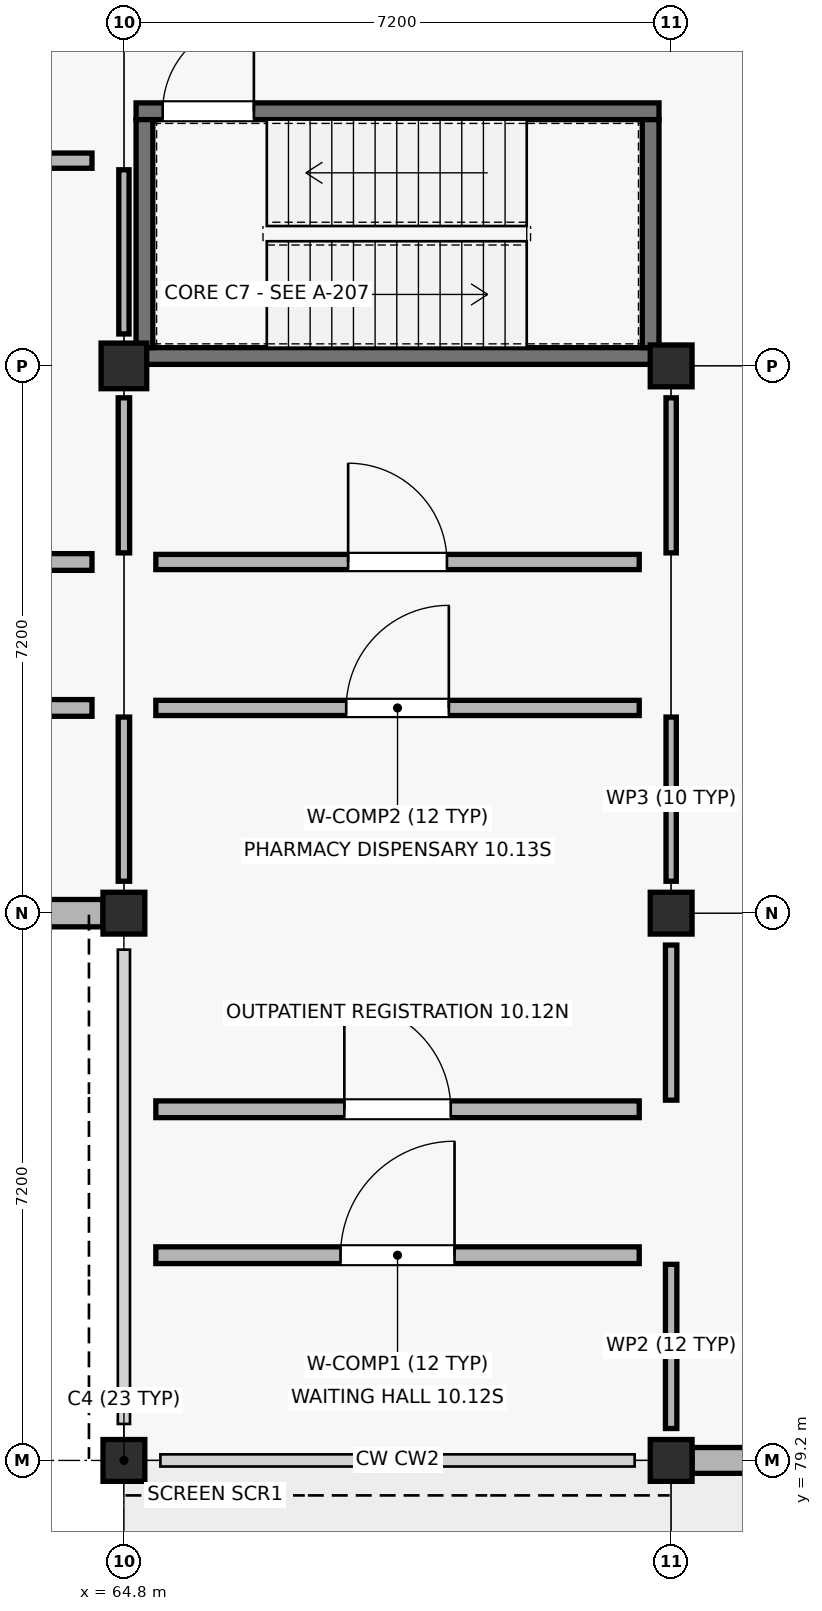
"""IFC4 building model, lengths in metres.
Left out: names, types, materials, properties, quantities, classifications, styles, units other than length and angle.
Written with IfcOpenShell. Run it as: python <this file> out.ifc"""

import sys

from ifc_helpers import new_model, si_unit, direction, frame, frame_2d, origin, origin_2d, place, context, subcontext, project, spatial, rectangle, extrude, element, fill, save


model = new_model("IFC4")
c1 = context("Model", 3, precision=1e-05, world=origin(), true_north=direction((0.0, 1.0)))
c2 = subcontext(c1, "Body", "Model", "MODEL_VIEW")
j1 = project(units=[si_unit("LENGTHUNIT", "METRE"), si_unit("PLANEANGLEUNIT", "RADIAN")], contexts=[c1])
p1 = place(None, origin())
s1 = spatial("IfcSite", under=j1, at=p1, CompositionType="ELEMENT")
p2 = place(p1, origin())
s2 = spatial("IfcBuilding", under=s1, at=p2, CompositionType="ELEMENT")
p3 = place(p2, origin())
s3 = spatial("IfcBuildingStorey", under=s2, at=p3, CompositionType="ELEMENT", Elevation=0.0)
for number, where, z_axis, x_axis in (
    (1, (64.8, 79.2, -0.25), (0.0, 0.0, 1.0), (1.0, 0.0, 0.0)),
    (2, (64.8, 86.4, -0.25), (0.0, 0.0, 1.0), (1.0, 0.0, 0.0)),
):
    element("IfcColumn", number, at=place(p3, frame(where, z_axis=z_axis, x_axis=x_axis)), inside=s3, PredefinedType="COLUMN", context=c2, shape_type="SweptSolid", body=[
        extrude(rectangle(XDim=0.55, YDim=0.55, at=origin_2d()), origin(), (0.0, 0.0, 1.0), 4.75),
    ])
p4 = place(p3, frame((64.8, 93.6, -0.25), z_axis=(0.0, 0.0, 1.0), x_axis=(1.0, 0.0, 0.0)))
e3 = element("IfcColumn", 3, at=p4, inside=s3, PredefinedType="COLUMN", context=c2, shape_type="SweptSolid", body=[
    extrude(rectangle(XDim=0.6, YDim=0.6, at=origin_2d()), origin(), (0.0, 0.0, 1.0), 4.75),
])
for number, where, z_axis, x_axis in (
    (4, (72.0, 79.2, -0.25), (0.0, 0.0, 1.0), (1.0, 0.0, 0.0)),
    (5, (72.0, 86.4, -0.25), (0.0, 0.0, 1.0), (1.0, 0.0, 0.0)),
    (6, (72.0, 93.6, -0.25), (0.0, 0.0, 1.0), (1.0, 0.0, 0.0)),
):
    element("IfcColumn", number, at=place(p3, frame(where, z_axis=z_axis, x_axis=x_axis)), inside=s3, PredefinedType="COLUMN", context=c2, shape_type="SweptSolid", body=[
        extrude(rectangle(XDim=0.55, YDim=0.55, at=origin_2d()), origin(), (0.0, 0.0, 1.0), 4.75),
    ])
p5 = place(p3, frame((57.9, 86.4, 0.0), z_axis=(0.0, 0.0, 1.0), x_axis=(1.0, 0.0, 0.0)))
e7 = element("IfcWall", 7, at=p5, inside=s3, PredefinedType="SOLIDWALL", context=c2, shape_type="SweptSolid", body=[
    extrude(rectangle(XDim=6.625, YDim=0.36, at=frame_2d((3.312, 0.0))), origin(), (0.0, 0.0, 1.0), 3.47),
])
p6 = place(p5, frame((0.925, 0.0, 0.9)))
e8 = element("IfcOpeningElement", 8, at=p6, cuts=e7, PredefinedType="OPENING", context=c2, shape_type="SweptSolid", body=[
    extrude(rectangle(XDim=1.65, YDim=1.88, at=frame_2d((0.825, 0.94))), frame((0.0, 0.19, 0.0), z_axis=(0.0, -1.0, 0.0), x_axis=(1.0, 0.0, 0.0)), (0.0, 0.0, 1.0), 0.38),
])
p7 = place(p5, frame((4.05, 0.0, 0.9)))
e9 = element("IfcOpeningElement", 9, at=p7, cuts=e7, PredefinedType="OPENING", context=c2, shape_type="SweptSolid", body=[
    extrude(rectangle(XDim=1.65, YDim=1.88, at=frame_2d((0.825, 0.94))), frame((0.0, 0.19, 0.0), z_axis=(0.0, -1.0, 0.0), x_axis=(1.0, 0.0, 0.0)), (0.0, 0.0, 1.0), 0.38),
])
p8 = place(p3, frame((78.95, 79.2, 0.0), z_axis=(0.0, 0.0, 1.0), x_axis=(-1.0, 0.0, 0.0)))
e10 = element("IfcWall", 10, at=p8, inside=s3, PredefinedType="SOLIDWALL", context=c2, shape_type="SweptSolid", body=[
    extrude(rectangle(XDim=6.675, YDim=0.34, at=frame_2d((3.337, 0.0))), origin(), (0.0, 0.0, 1.0), 3.47),
])
p9 = place(p8, frame((2.438, 0.0, 0.0)))
e11 = element("IfcOpeningElement", 11, at=p9, cuts=e10, PredefinedType="OPENING", context=c2, shape_type="SweptSolid", body=[
    extrude(rectangle(XDim=1.8, YDim=2.25, at=frame_2d((0.9, 1.125))), frame((0.0, 0.18, 0.0), z_axis=(0.0, -1.0, 0.0), x_axis=(1.0, 0.0, 0.0)), (0.0, 0.0, 1.0), 0.36),
])
p10 = place(p3, frame((64.96, 93.73, -0.25), z_axis=(0.0, 0.0, 1.0), x_axis=(1.0, 0.0, 0.0)))
e12 = element("IfcWall", 12, at=p10, inside=s3, PredefinedType="SHEAR", context=c2, shape_type="SweptSolid", body=[
    extrude(rectangle(XDim=6.88, YDim=0.22, at=frame_2d((3.44, 0.0))), origin(), (0.0, 0.0, 1.0), 4.47),
])
p11 = place(p3, frame((64.96, 96.95, -0.25), z_axis=(0.0, 0.0, 1.0), x_axis=(1.0, 0.0, 0.0)))
e13 = element("IfcWall", 13, at=p11, inside=s3, PredefinedType="SHEAR", context=c2, shape_type="SweptSolid", body=[
    extrude(rectangle(XDim=6.88, YDim=0.22, at=frame_2d((3.44, 0.0))), origin(), (0.0, 0.0, 1.0), 4.47),
])
p12 = place(p11, frame((0.35, 0.0, 0.25)))
e14 = element("IfcOpeningElement", 14, at=p12, cuts=e13, PredefinedType="OPENING", context=c2, shape_type="SweptSolid", body=[
    extrude(rectangle(XDim=1.2, YDim=2.15, at=frame_2d((0.6, 1.075))), frame((0.0, 0.12, 0.0), z_axis=(0.0, -1.0, 0.0), x_axis=(1.0, 0.0, 0.0)), (0.0, 0.0, 1.0), 0.24),
])
for number, where, z_axis, x_axis in (
    (15, (65.07, 93.84, -0.25), (0.0, 0.0, 1.0), (0.0, 1.0, 0.0)),
    (16, (71.73, 93.84, -0.25), (0.0, 0.0, 1.0), (0.0, 1.0, 0.0)),
):
    element("IfcWall", number, at=place(p3, frame(where, z_axis=z_axis, x_axis=x_axis)), inside=s3, PredefinedType="SHEAR", context=c2, shape_type="SweptSolid", body=[
        extrude(rectangle(XDim=3.0, YDim=0.22, at=frame_2d((1.5, 0.0))), origin(), (0.0, 0.0, 1.0), 4.47),
    ])
p13 = place(p3, frame((65.22, 81.9, 0.0), z_axis=(0.0, 0.0, 1.0), x_axis=(1.0, 0.0, 0.0)))
e17 = element("IfcWall", 17, at=p13, inside=s3, PredefinedType="SOLIDWALL", context=c2, shape_type="SweptSolid", body=[
    extrude(rectangle(XDim=6.36, YDim=0.22, at=frame_2d((3.18, 0.0))), origin(), (0.0, 0.0, 1.0), 3.36),
])
p14 = place(p13, frame((2.43, 0.0, 0.0)))
e18 = element("IfcOpeningElement", 18, at=p14, cuts=e17, PredefinedType="OPENING", context=c2, shape_type="SweptSolid", body=[
    extrude(rectangle(XDim=1.5, YDim=2.2, at=frame_2d((0.75, 1.1))), frame((0.0, 0.12, 0.0), z_axis=(0.0, -1.0, 0.0), x_axis=(1.0, 0.0, 0.0)), (0.0, 0.0, 1.0), 0.24),
])
p15 = place(p3, frame((72.0, 79.62, 0.0), z_axis=(0.0, 0.0, 1.0), x_axis=(0.0, 1.0, 0.0)))
e19 = element("IfcWall", 19, at=p15, inside=s3, PredefinedType="PARTITIONING", context=c2, shape_type="SweptSolid", body=[
    extrude(rectangle(XDim=2.16, YDim=0.15, at=frame_2d((1.08, 0.0))), origin(), (0.0, 0.0, 1.0), 3.36),
])
p16 = place(p3, frame((65.22, 83.82, 0.0), z_axis=(0.0, 0.0, 1.0), x_axis=(1.0, 0.0, 0.0)))
e20 = element("IfcWall", 20, at=p16, inside=s3, PredefinedType="SOLIDWALL", context=c2, shape_type="SweptSolid", body=[
    extrude(rectangle(XDim=6.36, YDim=0.22, at=frame_2d((3.18, 0.0))), origin(), (0.0, 0.0, 1.0), 3.36),
])
p17 = place(p16, frame((2.48, 0.0, 0.0)))
e21 = element("IfcOpeningElement", 21, at=p17, cuts=e20, PredefinedType="OPENING", context=c2, shape_type="SweptSolid", body=[
    extrude(rectangle(XDim=1.4, YDim=2.2, at=frame_2d((0.7, 1.1))), frame((0.0, 0.12, 0.0), z_axis=(0.0, -1.0, 0.0), x_axis=(1.0, 0.0, 0.0)), (0.0, 0.0, 1.0), 0.24),
])
p18 = place(p3, frame((72.0, 83.94, 0.0), z_axis=(0.0, 0.0, 1.0), x_axis=(0.0, 1.0, 0.0)))
e22 = element("IfcWall", 22, at=p18, inside=s3, PredefinedType="PARTITIONING", context=c2, shape_type="SweptSolid", body=[
    extrude(rectangle(XDim=2.04, YDim=0.15, at=frame_2d((1.02, 0.0))), origin(), (0.0, 0.0, 1.0), 3.36),
])
p19 = place(p3, frame((65.22, 89.1, 0.0), z_axis=(0.0, 0.0, 1.0), x_axis=(1.0, 0.0, 0.0)))
e23 = element("IfcWall", 23, at=p19, inside=s3, PredefinedType="SOLIDWALL", context=c2, shape_type="SweptSolid", body=[
    extrude(rectangle(XDim=6.36, YDim=0.2, at=frame_2d((3.18, 0.0))), origin(), (0.0, 0.0, 1.0), 3.36),
])
p20 = place(p19, frame((2.505, 0.0, 0.0)))
e24 = element("IfcOpeningElement", 24, at=p20, cuts=e23, PredefinedType="OPENING", context=c2, shape_type="SweptSolid", body=[
    extrude(rectangle(XDim=1.35, YDim=2.2, at=frame_2d((0.675, 1.1))), frame((0.0, 0.11, 0.0), z_axis=(0.0, -1.0, 0.0), x_axis=(1.0, 0.0, 0.0)), (0.0, 0.0, 1.0), 0.22),
])
p21 = place(p3, frame((72.0, 86.82, 0.0), z_axis=(0.0, 0.0, 1.0), x_axis=(0.0, 1.0, 0.0)))
e25 = element("IfcWall", 25, at=p21, inside=s3, PredefinedType="PARTITIONING", context=c2, shape_type="SweptSolid", body=[
    extrude(rectangle(XDim=2.16, YDim=0.135, at=frame_2d((1.08, 0.0))), origin(), (0.0, 0.0, 1.0), 3.36),
])
p22 = place(p3, frame((65.22, 91.02, 0.0), z_axis=(0.0, 0.0, 1.0), x_axis=(1.0, 0.0, 0.0)))
e26 = element("IfcWall", 26, at=p22, inside=s3, PredefinedType="SOLIDWALL", context=c2, shape_type="SweptSolid", body=[
    extrude(rectangle(XDim=6.36, YDim=0.2, at=frame_2d((3.18, 0.0))), origin(), (0.0, 0.0, 1.0), 3.36),
])
p23 = place(p22, frame((2.53, 0.0, 0.0)))
e27 = element("IfcOpeningElement", 27, at=p23, cuts=e26, PredefinedType="OPENING", context=c2, shape_type="SweptSolid", body=[
    extrude(rectangle(XDim=1.3, YDim=2.15, at=frame_2d((0.65, 1.075))), frame((0.0, 0.11, 0.0), z_axis=(0.0, -1.0, 0.0), x_axis=(1.0, 0.0, 0.0)), (0.0, 0.0, 1.0), 0.22),
])
p24 = place(p3, frame((72.0, 91.14, 0.0), z_axis=(0.0, 0.0, 1.0), x_axis=(0.0, 1.0, 0.0)))
e28 = element("IfcWall", 28, at=p24, inside=s3, PredefinedType="PARTITIONING", context=c2, shape_type="SweptSolid", body=[
    extrude(rectangle(XDim=2.04, YDim=0.135, at=frame_2d((1.02, 0.0))), origin(), (0.0, 0.0, 1.0), 3.36),
])
p25 = place(p3, frame((58.02, 89.1, 0.0), z_axis=(0.0, 0.0, 1.0), x_axis=(1.0, 0.0, 0.0)))
e29 = element("IfcWall", 29, at=p25, inside=s3, PredefinedType="SOLIDWALL", context=c2, shape_type="SweptSolid", body=[
    extrude(rectangle(XDim=6.36, YDim=0.22, at=frame_2d((3.18, 0.0))), origin(), (0.0, 0.0, 1.0), 3.36),
])
p26 = place(p25, frame((2.73, 0.0, 0.0)))
e30 = element("IfcOpeningElement", 30, at=p26, cuts=e29, PredefinedType="OPENING", context=c2, shape_type="SweptSolid", body=[
    extrude(rectangle(XDim=0.9, YDim=2.19, at=frame_2d((0.45, 1.095))), frame((0.0, 0.12, 0.0), z_axis=(0.0, -1.0, 0.0), x_axis=(1.0, 0.0, 0.0)), (0.0, 0.0, 1.0), 0.24),
])
p27 = place(p3, frame((64.8, 86.82, 0.0), z_axis=(0.0, 0.0, 1.0), x_axis=(0.0, 1.0, 0.0)))
e31 = element("IfcWall", 31, at=p27, inside=s3, PredefinedType="PARTITIONING", context=c2, shape_type="SweptSolid", body=[
    extrude(rectangle(XDim=2.16, YDim=0.15, at=frame_2d((1.08, 0.0))), origin(), (0.0, 0.0, 1.0), 3.36),
])
p28 = place(p3, frame((58.02, 91.02, 0.0), z_axis=(0.0, 0.0, 1.0), x_axis=(1.0, 0.0, 0.0)))
e32 = element("IfcWall", 32, at=p28, inside=s3, PredefinedType="SOLIDWALL", context=c2, shape_type="SweptSolid", body=[
    extrude(rectangle(XDim=6.36, YDim=0.22, at=frame_2d((3.18, 0.0))), origin(), (0.0, 0.0, 1.0), 3.36),
])
p29 = place(p28, frame((2.71, 0.0, 0.0)))
e33 = element("IfcOpeningElement", 33, at=p29, cuts=e32, PredefinedType="OPENING", context=c2, shape_type="SweptSolid", body=[
    extrude(rectangle(XDim=0.94, YDim=2.19, at=frame_2d((0.47, 1.095))), frame((0.0, 0.12, 0.0), z_axis=(0.0, -1.0, 0.0), x_axis=(1.0, 0.0, 0.0)), (0.0, 0.0, 1.0), 0.24),
])
p30 = place(p3, frame((64.8, 91.14, 0.0), z_axis=(0.0, 0.0, 1.0), x_axis=(0.0, 1.0, 0.0)))
e34 = element("IfcWall", 34, at=p30, inside=s3, PredefinedType="PARTITIONING", context=c2, shape_type="SweptSolid", body=[
    extrude(rectangle(XDim=2.04, YDim=0.15, at=frame_2d((1.02, 0.0))), origin(), (0.0, 0.0, 1.0), 3.36),
])
p31 = place(p3, frame((58.02, 96.3, 0.0), z_axis=(0.0, 0.0, 1.0), x_axis=(1.0, 0.0, 0.0)))
e35 = element("IfcWall", 35, at=p31, inside=s3, PredefinedType="SOLIDWALL", context=c2, shape_type="SweptSolid", body=[
    extrude(rectangle(XDim=6.36, YDim=0.2, at=frame_2d((3.18, 0.0))), origin(), (0.0, 0.0, 1.0), 3.36),
])
p32 = place(p31, frame((2.69, 0.0, 0.0)))
e36 = element("IfcOpeningElement", 36, at=p32, cuts=e35, PredefinedType="OPENING", context=c2, shape_type="SweptSolid", body=[
    extrude(rectangle(XDim=0.98, YDim=2.19, at=frame_2d((0.49, 1.095))), frame((0.0, 0.11, 0.0), z_axis=(0.0, -1.0, 0.0), x_axis=(1.0, 0.0, 0.0)), (0.0, 0.0, 1.0), 0.22),
])
p33 = place(p3, frame((64.8, 94.02, 0.0), z_axis=(0.0, 0.0, 1.0), x_axis=(0.0, 1.0, 0.0)))
e37 = element("IfcWall", 37, at=p33, inside=s3, PredefinedType="PARTITIONING", context=c2, shape_type="SweptSolid", body=[
    extrude(rectangle(XDim=2.16, YDim=0.135, at=frame_2d((1.08, 0.0))), origin(), (0.0, 0.0, 1.0), 3.36),
])
p34 = place(p12, origin())
e38 = element("IfcDoor", 38, at=p34, inside=s3, OperationType="SINGLE_SWING_RIGHT", PredefinedType="DOOR", context=c2, shape_type="SweptSolid", body=[
    extrude(rectangle(XDim=1.2, YDim=2.15, at=frame_2d((0.6, 1.075))), frame((0.0, 0.025, 0.0), z_axis=(0.0, -1.0, 0.0), x_axis=(1.0, 0.0, 0.0)), (0.0, 0.0, 1.0), 0.05),
])
fill(e14, e38)
p35 = place(p14, origin())
e39 = element("IfcDoor", 39, at=p35, inside=s3, OperationType="SINGLE_SWING_RIGHT", PredefinedType="DOOR", context=c2, shape_type="SweptSolid", body=[
    extrude(rectangle(XDim=1.5, YDim=2.2, at=frame_2d((0.75, 1.1))), frame((0.0, 0.025, 0.0), z_axis=(0.0, -1.0, 0.0), x_axis=(1.0, 0.0, 0.0)), (0.0, 0.0, 1.0), 0.05),
])
fill(e18, e39)
p36 = place(p17, origin())
e40 = element("IfcDoor", 40, at=p36, inside=s3, OperationType="SINGLE_SWING_LEFT", PredefinedType="DOOR", context=c2, shape_type="SweptSolid", body=[
    extrude(rectangle(XDim=1.4, YDim=2.2, at=frame_2d((0.7, 1.1))), frame((0.0, 0.025, 0.0), z_axis=(0.0, -1.0, 0.0), x_axis=(1.0, 0.0, 0.0)), (0.0, 0.0, 1.0), 0.05),
])
fill(e21, e40)
p37 = place(p20, origin())
e41 = element("IfcDoor", 41, at=p37, inside=s3, OperationType="SINGLE_SWING_RIGHT", PredefinedType="DOOR", context=c2, shape_type="SweptSolid", body=[
    extrude(rectangle(XDim=1.35, YDim=2.2, at=frame_2d((0.675, 1.1))), frame((0.0, 0.025, 0.0), z_axis=(0.0, -1.0, 0.0), x_axis=(1.0, 0.0, 0.0)), (0.0, 0.0, 1.0), 0.05),
])
fill(e24, e41)
p38 = place(p23, origin())
e42 = element("IfcDoor", 42, at=p38, inside=s3, OperationType="SINGLE_SWING_LEFT", PredefinedType="DOOR", context=c2, shape_type="SweptSolid", body=[
    extrude(rectangle(XDim=1.3, YDim=2.15, at=frame_2d((0.65, 1.075))), frame((0.0, 0.025, 0.0), z_axis=(0.0, -1.0, 0.0), x_axis=(1.0, 0.0, 0.0)), (0.0, 0.0, 1.0), 0.05),
])
fill(e27, e42)
save(model, sys.argv[1])
